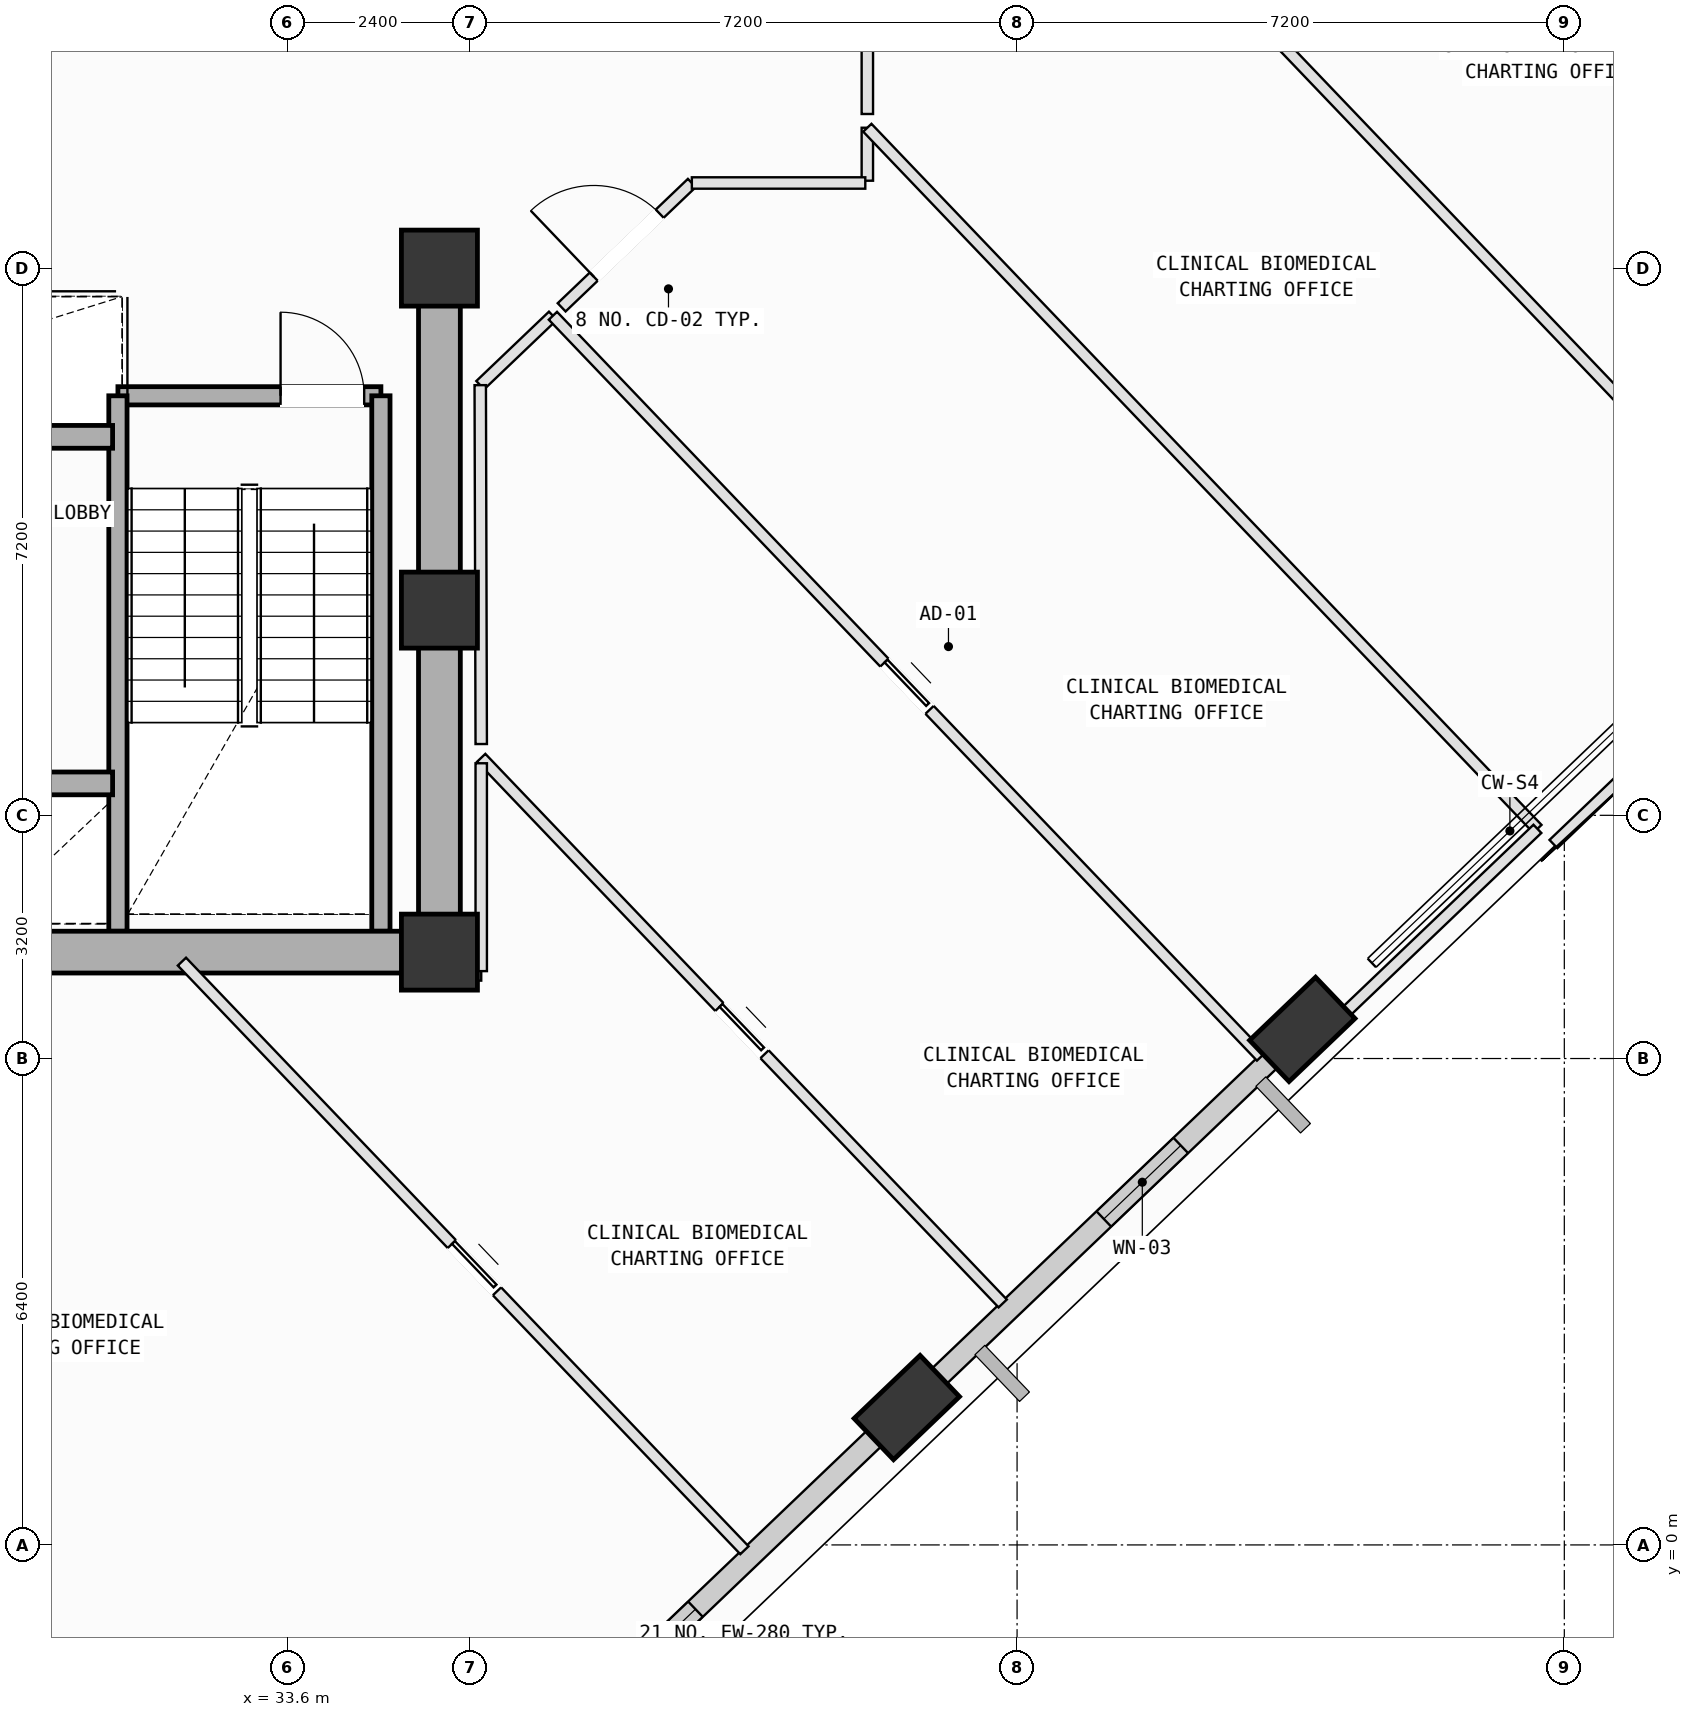
"""IFC4 building model, lengths in metres.
Left out: names, types, materials, properties, quantities, classifications, styles, units other than length and angle.
Written with IfcOpenShell. Run it as: python <this file> out.ifc"""

import sys

from ifc_helpers import new_model, si_unit, direction, frame, frame_2d, origin, origin_2d, place, context, subcontext, project, spatial, rectangle, extrude, element, fill, save


model = new_model("IFC4")
c1 = context("Model", 3, precision=1e-05, world=origin(), true_north=direction((0.0, 1.0)))
c2 = subcontext(c1, "Body", "Model", "MODEL_VIEW")
j1 = project(units=[si_unit("LENGTHUNIT", "METRE"), si_unit("PLANEANGLEUNIT", "RADIAN")], contexts=[c1])
p1 = place(None, origin())
s1 = spatial("IfcSite", under=j1, at=p1, CompositionType="ELEMENT")
p2 = place(p1, origin())
s2 = spatial("IfcBuilding", under=s1, at=p2, CompositionType="ELEMENT")
p3 = place(p2, frame((0.0, 0.0, 211.2)))
s3 = spatial("IfcBuildingStorey", under=s2, at=p3, CompositionType="ELEMENT", Elevation=211.2)
for number, where, z_axis, x_axis in (
    (1, (35.6, 7.8, 0.0), (0.0, 0.0, 1.0), (1.0, 0.0, 0.0)),
    (2, (35.6, 12.3, 0.0), (0.0, 0.0, 1.0), (1.0, 0.0, 0.0)),
    (3, (35.6, 16.8, 0.0), (0.0, 0.0, 1.0), (1.0, 0.0, 0.0)),
):
    element("IfcColumn", number, at=place(p3, frame(where, z_axis=z_axis, x_axis=x_axis)), inside=s3, PredefinedType="COLUMN", context=c2, shape_type="SweptSolid", body=[
        extrude(rectangle(XDim=1.0, YDim=1.0, at=origin_2d()), origin(), (0.0, 0.0, 1.0), 4.0),
    ])
p4 = place(p3, frame((41.749, 1.808, 0.072), z_axis=(0.094519466508, 0.034393209017, 0.994928729922), x_axis=(-0.893156453622, 0.444345139292, 0.069490621965)))
e4 = element("IfcColumn", 4, at=p4, inside=s3, PredefinedType="COLUMN", context=c2, shape_type="SweptSolid", body=[
    extrude(rectangle(XDim=1.2, YDim=0.75, at=origin_2d()), origin(), (0.0, 0.0, 1.0), 3.947),
])
p5 = place(p3, frame((46.953, 6.783, 0.066), z_axis=(0.073934620991, 0.055698238723, 0.995706471819), x_axis=(-0.984464854778, 0.163520603796, 0.06395280948)))
e5 = element("IfcColumn", 5, at=p5, inside=s3, PredefinedType="COLUMN", context=c2, shape_type="SweptSolid", body=[
    extrude(rectangle(XDim=1.2, YDim=0.75, at=origin_2d()), origin(), (0.0, 0.0, 1.0), 3.949),
])
p6 = place(p3, frame((29.798, 19.298, 0.019), z_axis=(0.022938777207, -0.015578741739, 0.999615483727), x_axis=(-0.813978214162, 0.580233554641, 0.027721633021)))
e6 = element("IfcColumn", 6, at=p6, inside=s3, PredefinedType="COLUMN", context=c2, shape_type="SweptSolid", body=[
    extrude(rectangle(XDim=1.2, YDim=0.75, at=origin_2d()), origin(), (0.0, 0.0, 1.0), 3.98),
])
p7 = place(p3, frame((41.595, 1.664, 0.0), z_axis=(0.0, 0.0, 1.0), x_axis=(-0.722963755232, -0.690885959201, 0.0)))
e7 = element("IfcWall", 7, at=p7, inside=s3, PredefinedType="SOLIDWALL", context=c2, shape_type="SweptSolid", body=[
    extrude(rectangle(XDim=6.439, YDim=0.28, at=frame_2d((3.219, 0.0))), origin(), (0.0, 0.0, 1.0), 3.265),
])
p8 = place(p7, frame((3.633, 0.0, 0.75)))
e8 = element("IfcOpeningElement", 8, at=p8, cuts=e7, PredefinedType="OPENING", context=c2, shape_type="SweptSolid", body=[
    extrude(rectangle(XDim=2.0, YDim=1.95, at=frame_2d((1.0, 0.975))), frame((0.0, 0.15, 0.0), z_axis=(0.0, -1.0, 0.0), x_axis=(1.0, 0.0, 0.0)), (0.0, 0.0, 1.0), 0.3),
])
p9 = place(p3, frame((46.794, 6.633, 0.0), z_axis=(0.0, 0.0, 1.0), x_axis=(-0.722951816102, -0.690898452448, 0.0)))
e9 = element("IfcWall", 9, at=p9, inside=s3, PredefinedType="SOLIDWALL", context=c2, shape_type="SweptSolid", body=[
    extrude(rectangle(XDim=6.413, YDim=0.28, at=frame_2d((3.207, 0.0))), origin(), (0.0, 0.0, 1.0), 3.265),
])
p10 = place(p9, frame((1.993, 0.0, 0.75)))
e10 = element("IfcOpeningElement", 10, at=p10, cuts=e9, PredefinedType="OPENING", context=c2, shape_type="SweptSolid", body=[
    extrude(rectangle(XDim=1.4, YDim=1.85, at=frame_2d((0.7, 0.925))), frame((0.0, 0.15, 0.0), z_axis=(0.0, -1.0, 0.0), x_axis=(1.0, 0.0, 0.0)), (0.0, 0.0, 1.0), 0.3),
])
p11 = place(p3, frame((30.09, 19.579, 0.0), z_axis=(0.0, 0.0, 1.0), x_axis=(0.722961207673, 0.690888625033, 0.0)))
e11 = element("IfcWall", 11, at=p11, inside=s3, PredefinedType="SOLIDWALL", context=c2, shape_type="SweptSolid", body=[
    extrude(rectangle(XDim=6.158, YDim=0.28, at=frame_2d((3.079, 0.0))), origin(), (0.0, 0.0, 1.0), 2.765),
])
p12 = place(p11, frame((3.669, 0.0, 0.75)))
e12 = element("IfcOpeningElement", 12, at=p12, cuts=e11, PredefinedType="OPENING", context=c2, shape_type="SweptSolid", body=[
    extrude(rectangle(XDim=1.2, YDim=1.75, at=frame_2d((0.6, 0.875))), frame((0.0, 0.15, 0.0), z_axis=(0.0, -1.0, 0.0), x_axis=(1.0, 0.0, 0.0)), (0.0, 0.0, 1.0), 0.3),
])
p13 = place(p3, frame((31.37, 15.12, 0.0), z_axis=(0.0, 0.0, 1.0), x_axis=(1.0, 0.0, 0.0)))
e13 = element("IfcWall", 13, at=p13, inside=s3, PredefinedType="SOLIDWALL", context=c2, shape_type="SweptSolid", body=[
    extrude(rectangle(XDim=3.46, YDim=0.24, at=frame_2d((1.73, 0.0))), origin(), (0.0, 0.0, 1.0), 3.78),
])
p14 = place(p13, frame((2.14, 0.0, 0.0)))
e14 = element("IfcOpeningElement", 14, at=p14, cuts=e13, PredefinedType="OPENING", context=c2, shape_type="SweptSolid", body=[
    extrude(rectangle(XDim=1.1, YDim=2.15, at=frame_2d((0.55, 1.075))), frame((0.0, 0.13, 0.0), z_axis=(0.0, -1.0, 0.0), x_axis=(1.0, 0.0, 0.0)), (0.0, 0.0, 1.0), 0.26),
])
for number, where, z_axis, x_axis in (
    (15, (34.83, 15.12, 0.0), (0.0, 0.0, 1.0), (0.0, -1.0, 0.0)),
    (16, (31.37, 8.075, 0.0), (0.0, 0.0, 1.0), (0.0, 1.0, 0.0)),
):
    element("IfcWall", number, at=place(p3, frame(where, z_axis=z_axis, x_axis=x_axis)), inside=s3, PredefinedType="SOLIDWALL", context=c2, shape_type="SweptSolid", body=[
        extrude(rectangle(XDim=7.045, YDim=0.24, at=frame_2d((3.522, 0.0))), origin(), (0.0, 0.0, 1.0), 3.78),
    ])
p15 = place(p3, frame((24.8, 7.8, 0.0), z_axis=(0.0, 0.0, 1.0), x_axis=(1.0, 0.0, 0.0)))
e17 = element("IfcWall", 17, at=p15, inside=s3, PredefinedType="SHEAR", context=c2, shape_type="SweptSolid", body=[
    extrude(rectangle(XDim=10.8, YDim=0.55, at=frame_2d((5.4, 0.0))), origin(), (0.0, 0.0, 1.0), 3.78),
])
p16 = place(p3, frame((35.6, 7.8, 0.0), z_axis=(0.0, 0.0, 1.0), x_axis=(0.0, 1.0, 0.0)))
e18 = element("IfcWall", 18, at=p16, inside=s3, PredefinedType="SHEAR", context=c2, shape_type="SweptSolid", body=[
    extrude(rectangle(XDim=9.0, YDim=0.55, at=frame_2d((4.5, 0.0))), origin(), (0.0, 0.0, 1.0), 3.78),
])
p17 = place(p3, frame((29.6, 10.02, 0.0), z_axis=(0.0, 0.0, 1.0), x_axis=(1.0, 0.0, 0.0)))
e19 = element("IfcWall", 19, at=p17, inside=s3, PredefinedType="SOLIDWALL", context=c2, shape_type="SweptSolid", body=[
    extrude(rectangle(XDim=1.7, YDim=0.3, at=frame_2d((0.85, 0.0))), origin(), (0.0, 0.0, 1.0), 3.78),
])
p18 = place(p3, frame((25.85, 14.58, 0.0), z_axis=(0.0, 0.0, 1.0), x_axis=(1.0, 0.0, 0.0)))
e20 = element("IfcWall", 20, at=p18, inside=s3, PredefinedType="SOLIDWALL", context=c2, shape_type="SweptSolid", body=[
    extrude(rectangle(XDim=5.45, YDim=0.3, at=frame_2d((2.725, 0.0))), origin(), (0.0, 0.0, 1.0), 3.78),
])
p19 = place(p18, frame((0.34, 0.0, 0.0)))
e21 = element("IfcOpeningElement", 21, at=p19, cuts=e20, PredefinedType="OPENING", context=c2, shape_type="SweptSolid", body=[
    extrude(rectangle(XDim=1.12, YDim=2.15, at=frame_2d((0.56, 1.075))), frame((0.0, 0.16, 0.0), z_axis=(0.0, -1.0, 0.0), x_axis=(1.0, 0.0, 0.0)), (0.0, 0.0, 1.0), 0.32),
])
p20 = place(p18, frame((2.24, 0.0, 0.0)))
e22 = element("IfcOpeningElement", 22, at=p20, cuts=e20, PredefinedType="OPENING", context=c2, shape_type="SweptSolid", body=[
    extrude(rectangle(XDim=1.12, YDim=2.15, at=frame_2d((0.56, 1.075))), frame((0.0, 0.16, 0.0), z_axis=(0.0, -1.0, 0.0), x_axis=(1.0, 0.0, 0.0)), (0.0, 0.0, 1.0), 0.32),
])
p21 = place(p3, frame((33.172, -6.704, 0.0), z_axis=(0.0, 0.0, 1.0), x_axis=(-0.690878686179, 0.722970705481, 0.0)))
e23 = element("IfcWall", 23, at=p21, inside=s3, PredefinedType="PARTITIONING", context=c2, shape_type="SweptSolid", body=[
    extrude(rectangle(XDim=13.831, YDim=0.15, at=frame_2d((6.915, 0.0))), origin(), (0.0, 0.0, 1.0), 3.78),
])
p22 = place(p3, frame((32.212, 7.675, 0.0), z_axis=(0.0, 0.0, 1.0), x_axis=(0.690869154535, -0.722979813903, 0.0)))
e24 = element("IfcWall", 24, at=p22, inside=s3, PredefinedType="PARTITIONING", context=c2, shape_type="SweptSolid", body=[
    extrude(rectangle(XDim=10.713, YDim=0.15, at=frame_2d((5.356, 0.0))), origin(), (0.0, 0.0, 1.0), 3.78),
])
p23 = place(p22, frame((5.14, 0.0, 0.0)))
e25 = element("IfcOpeningElement", 25, at=p23, cuts=e24, PredefinedType="OPENING", context=c2, shape_type="SweptSolid", body=[
    extrude(rectangle(XDim=0.86, YDim=2.06, at=frame_2d((0.43, 1.03))), frame((0.0, 0.085, 0.0), z_axis=(0.0, -1.0, 0.0), x_axis=(1.0, 0.0, 0.0)), (0.0, 0.0, 1.0), 0.17),
])
p24 = place(p3, frame((36.15, 10.357, 0.0), z_axis=(0.0, 0.0, 1.0), x_axis=(0.690871478305, -0.722977593335, 0.0)))
e26 = element("IfcWall", 26, at=p24, inside=s3, PredefinedType="PARTITIONING", context=c2, shape_type="SweptSolid", body=[
    extrude(rectangle(XDim=9.931, YDim=0.15, at=frame_2d((4.966, 0.0))), origin(), (0.0, 0.0, 1.0), 3.78),
])
p25 = place(p24, frame((4.535, 0.0, 0.0)))
e27 = element("IfcOpeningElement", 27, at=p25, cuts=e26, PredefinedType="OPENING", context=c2, shape_type="SweptSolid", body=[
    extrude(rectangle(XDim=0.86, YDim=2.06, at=frame_2d((0.43, 1.03))), frame((0.0, 0.085, 0.0), z_axis=(0.0, -1.0, 0.0), x_axis=(1.0, 0.0, 0.0)), (0.0, 0.0, 1.0), 0.17),
])
p26 = place(p3, frame((42.317, 2.035, 0.0), z_axis=(0.0, 0.0, 1.0), x_axis=(-0.723697447881, -0.690117384168, 0.0)))
e28 = element("IfcWall", 28, at=p26, inside=s3, PredefinedType="PARTITIONING", context=c2, shape_type="SweptSolid", body=[
    extrude(rectangle(XDim=0.778, YDim=0.15, at=frame_2d((0.389, 0.0))), origin(), (0.0, 0.0, 1.0), 3.265),
])
p27 = place(p3, frame((35.6, 7.5, 0.0), z_axis=(0.0, 0.0, 1.0), x_axis=(1.0, 0.0, 0.0)))
e29 = element("IfcWall", 29, at=p27, inside=s3, PredefinedType="PARTITIONING", context=c2, shape_type="SweptSolid", body=[
    extrude(rectangle(XDim=0.55, YDim=0.15, at=frame_2d((0.275, 0.0))), origin(), (0.0, 0.0, 1.0), 2.765),
])
p28 = place(p3, frame((36.15, 7.55, 0.0), z_axis=(0.0, 0.0, 1.0), x_axis=(0.0, 1.0, 0.0)))
e30 = element("IfcWall", 30, at=p28, inside=s3, PredefinedType="PARTITIONING", context=c2, shape_type="SweptSolid", body=[
    extrude(rectangle(XDim=2.735, YDim=0.15, at=frame_2d((1.367, 0.0))), origin(), (0.0, 0.0, 1.0), 2.765),
])
p29 = place(p3, frame((36.137, 15.26, 0.0), z_axis=(0.0, 0.0, 1.0), x_axis=(0.723171047123, 0.690668977589, 0.0)))
e31 = element("IfcWall", 31, at=p29, inside=s3, PredefinedType="PARTITIONING", context=c2, shape_type="SweptSolid", body=[
    extrude(rectangle(XDim=1.322, YDim=0.15, at=frame_2d((0.661, 0.0))), origin(), (0.0, 0.0, 1.0), 3.78),
])
p30 = place(p3, frame((37.093, 16.173, 0.0), z_axis=(0.0, 0.0, 1.0), x_axis=(0.690902774349, -0.722947685795, 0.0)))
e32 = element("IfcWall", 32, at=p30, inside=s3, PredefinedType="PARTITIONING", context=c2, shape_type="SweptSolid", body=[
    extrude(rectangle(XDim=13.485, YDim=0.15, at=frame_2d((6.743, 0.0))), origin(), (0.0, 0.0, 1.0), 3.78),
])
p31 = place(p30, frame((6.312, 0.0, 0.0)))
e33 = element("IfcOpeningElement", 33, at=p31, cuts=e32, PredefinedType="OPENING", context=c2, shape_type="SweptSolid", body=[
    extrude(rectangle(XDim=0.86, YDim=2.06, at=frame_2d((0.43, 1.03))), frame((0.0, 0.085, 0.0), z_axis=(0.0, -1.0, 0.0), x_axis=(1.0, 0.0, 0.0)), (0.0, 0.0, 1.0), 0.17),
])
p32 = place(p3, frame((36.15, 10.538, 0.0), z_axis=(0.0, 0.0, 1.0), x_axis=(-0.002740282354, 0.999996245419, 0.0)))
e34 = element("IfcWall", 34, at=p32, inside=s3, PredefinedType="PARTITIONING", context=c2, shape_type="SweptSolid", body=[
    extrude(rectangle(XDim=4.722, YDim=0.15, at=frame_2d((2.361, 0.0))), origin(), (0.0, 0.0, 1.0), 3.78),
])
p33 = place(p3, frame((41.23, 17.95, 0.0), z_axis=(0.0, 0.0, 1.0), x_axis=(0.0, 1.0, 0.0)))
e35 = element("IfcWall", 35, at=p33, inside=s3, PredefinedType="PARTITIONING", context=c2, shape_type="SweptSolid", body=[
    extrude(rectangle(XDim=0.697, YDim=0.15, at=frame_2d((0.349, 0.0))), origin(), (0.0, 0.0, 1.0), 3.78),
])
p34 = place(p3, frame((41.23, 18.647, 0.0), z_axis=(0.0, 0.0, 1.0), x_axis=(0.690901109008, -0.722949277316, 0.0)))
e36 = element("IfcWall", 36, at=p34, inside=s3, PredefinedType="PARTITIONING", context=c2, shape_type="SweptSolid", body=[
    extrude(rectangle(XDim=12.76, YDim=0.15, at=frame_2d((6.38, 0.0))), origin(), (0.0, 0.0, 1.0), 3.78),
])
p35 = place(p3, frame((50.046, 9.422, 0.0), z_axis=(0.0, 0.0, 1.0), x_axis=(-0.723045801537, -0.690800093283, 0.0)))
e37 = element("IfcWall", 37, at=p35, inside=s3, PredefinedType="PARTITIONING", context=c2, shape_type="SweptSolid", body=[
    extrude(rectangle(XDim=4.278, YDim=0.15, at=frame_2d((2.139, 0.0))), origin(), (0.0, 0.0, 1.0), 3.265),
])
p36 = place(p3, frame((37.208, 16.284, 0.0), z_axis=(0.0, 0.0, 1.0), x_axis=(0.723154271993, 0.690686541709, 0.0)))
e38 = element("IfcWall", 38, at=p36, inside=s3, PredefinedType="PARTITIONING", context=c2, shape_type="SweptSolid", body=[
    extrude(rectangle(XDim=2.369, YDim=0.15, at=frame_2d((1.184, 0.0))), origin(), (0.0, 0.0, 1.0), 3.78),
])
p37 = place(p36, frame((0.584, 0.0, 0.0)))
e39 = element("IfcOpeningElement", 39, at=p37, cuts=e38, PredefinedType="OPENING", context=c2, shape_type="SweptSolid", body=[
    extrude(rectangle(XDim=1.2, YDim=2.15, at=frame_2d((0.6, 1.075))), frame((0.0, 0.085, 0.0), z_axis=(0.0, -1.0, 0.0), x_axis=(1.0, 0.0, 0.0)), (0.0, 0.0, 1.0), 0.17),
])
p38 = place(p3, frame((38.921, 17.92, 0.0), z_axis=(0.0, 0.0, 1.0), x_axis=(1.0, 0.0, 0.0)))
e40 = element("IfcWall", 40, at=p38, inside=s3, PredefinedType="PARTITIONING", context=c2, shape_type="SweptSolid", body=[
    extrude(rectangle(XDim=2.282, YDim=0.15, at=frame_2d((1.141, 0.0))), origin(), (0.0, 0.0, 1.0), 3.78),
])
p39 = place(p3, frame((43.889, 22.667, 0.0), z_axis=(0.0, 0.0, 1.0), x_axis=(0.690910559681, -0.722940245471, 0.0)))
e41 = element("IfcWall", 41, at=p39, inside=s3, PredefinedType="PARTITIONING", context=c2, shape_type="SweptSolid", body=[
    extrude(rectangle(XDim=13.484, YDim=0.15, at=frame_2d((6.742, 0.0))), origin(), (0.0, 0.0, 1.0), 3.415),
])
p40 = place(p3, frame((41.23, 18.828, 0.0), z_axis=(0.0, 0.0, 1.0), x_axis=(0.0, 1.0, 0.0)))
e42 = element("IfcWall", 42, at=p40, inside=s3, PredefinedType="PARTITIONING", context=c2, shape_type="SweptSolid", body=[
    extrude(rectangle(XDim=1.299, YDim=0.15, at=frame_2d((0.649, 0.0))), origin(), (0.0, 0.0, 1.0), 3.78),
])
p41 = place(p3, frame((47.287, 25.915, 0.0), z_axis=(0.0, 0.0, 1.0), x_axis=(0.690828749695, -0.72301842203, 0.0)))
e43 = element("IfcWall", 43, at=p41, inside=s3, PredefinedType="PARTITIONING", context=c2, shape_type="SweptSolid", body=[
    extrude(rectangle(XDim=13.485, YDim=0.15, at=frame_2d((6.743, 0.0))), origin(), (0.0, 0.0, 1.0), 3.78),
])
p42 = place(p3, frame((54.732, 13.499, 0.0), z_axis=(0.0, 0.0, 1.0), x_axis=(-0.722899628279, -0.690953057331, 0.0)))
e44 = element("IfcWall", 44, at=p42, inside=s3, PredefinedType="PARTITIONING", context=c2, shape_type="SweptSolid", body=[
    extrude(rectangle(XDim=6.19, YDim=0.15, at=frame_2d((3.095, 0.0))), origin(), (0.0, 0.0, 1.0), 3.78),
])
p43 = place(p8, origin())
e45 = element("IfcWindow", 45, at=p43, inside=s3, PartitioningType="SINGLE_PANEL", PredefinedType="WINDOW", context=c2, shape_type="SweptSolid", body=[
    extrude(rectangle(XDim=2.0, YDim=1.95, at=frame_2d((1.0, 0.975))), frame((0.0, 0.03, 0.0), z_axis=(0.0, -1.0, 0.0), x_axis=(1.0, 0.0, 0.0)), (0.0, 0.0, 1.0), 0.06),
])
fill(e8, e45)
p44 = place(p10, origin())
e46 = element("IfcWindow", 46, at=p44, inside=s3, PartitioningType="SINGLE_PANEL", PredefinedType="WINDOW", context=c2, shape_type="SweptSolid", body=[
    extrude(rectangle(XDim=1.4, YDim=1.85, at=frame_2d((0.7, 0.925))), frame((0.0, 0.03, 0.0), z_axis=(0.0, -1.0, 0.0), x_axis=(1.0, 0.0, 0.0)), (0.0, 0.0, 1.0), 0.06),
])
fill(e10, e46)
p45 = place(p14, origin())
e47 = element("IfcDoor", 47, at=p45, inside=s3, OperationType="SINGLE_SWING_LEFT", PredefinedType="DOOR", context=c2, shape_type="SweptSolid", body=[
    extrude(rectangle(XDim=1.1, YDim=2.15, at=frame_2d((0.55, 1.075))), frame((0.0, 0.025, 0.0), z_axis=(0.0, -1.0, 0.0), x_axis=(1.0, 0.0, 0.0)), (0.0, 0.0, 1.0), 0.05),
])
fill(e14, e47)
p46 = place(p37, origin())
e48 = element("IfcDoor", 48, at=p46, inside=s3, OperationType="SINGLE_SWING_LEFT", PredefinedType="DOOR", context=c2, shape_type="SweptSolid", body=[
    extrude(rectangle(XDim=1.2, YDim=2.15, at=frame_2d((0.6, 1.075))), frame((0.0, 0.025, 0.0), z_axis=(0.0, -1.0, 0.0), x_axis=(1.0, 0.0, 0.0)), (0.0, 0.0, 1.0), 0.05),
])
fill(e39, e48)
p47 = place(p31, origin())
e49 = element("IfcDoor", 49, at=p47, inside=s3, OperationType="SLIDING_TO_LEFT", PredefinedType="DOOR", context=c2, shape_type="SweptSolid", body=[
    extrude(rectangle(XDim=0.86, YDim=2.06, at=frame_2d((0.43, 1.03))), frame((0.0, 0.025, 0.0), z_axis=(0.0, -1.0, 0.0), x_axis=(1.0, 0.0, 0.0)), (0.0, 0.0, 1.0), 0.05),
])
fill(e33, e49)
p48 = place(p25, origin())
e50 = element("IfcDoor", 50, at=p48, inside=s3, OperationType="SLIDING_TO_LEFT", PredefinedType="DOOR", context=c2, shape_type="SweptSolid", body=[
    extrude(rectangle(XDim=0.86, YDim=2.06, at=frame_2d((0.43, 1.03))), frame((0.0, 0.025, 0.0), z_axis=(0.0, -1.0, 0.0), x_axis=(1.0, 0.0, 0.0)), (0.0, 0.0, 1.0), 0.05),
])
fill(e27, e50)
p49 = place(p23, origin())
e51 = element("IfcDoor", 51, at=p49, inside=s3, OperationType="SLIDING_TO_LEFT", PredefinedType="DOOR", context=c2, shape_type="SweptSolid", body=[
    extrude(rectangle(XDim=0.86, YDim=2.06, at=frame_2d((0.43, 1.03))), frame((0.0, 0.025, 0.0), z_axis=(0.0, -1.0, 0.0), x_axis=(1.0, 0.0, 0.0)), (0.0, 0.0, 1.0), 0.05),
])
fill(e25, e51)
save(model, sys.argv[1])
